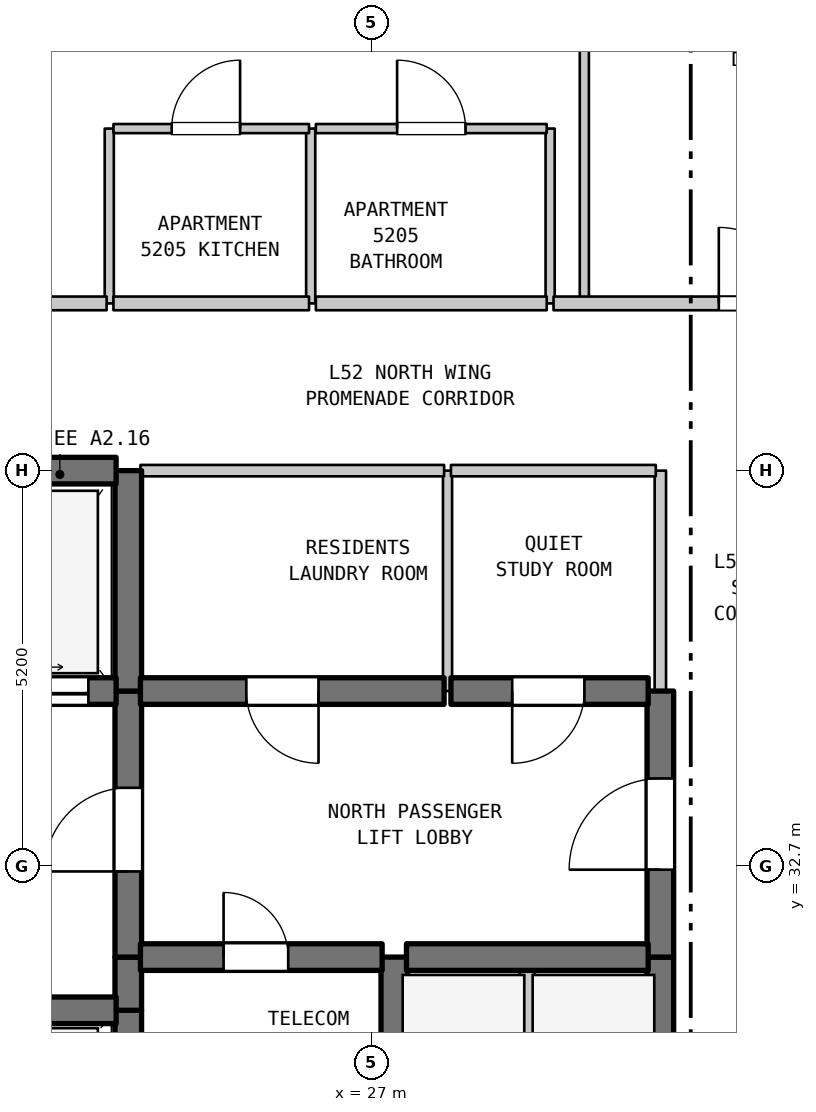
"""IFC4 building model, lengths in metres.
Left out: names, types, materials, properties, quantities, classifications, styles, units other than length and angle.
Written with IfcOpenShell. Run it as: python <this file> out.ifc"""

import sys

from ifc_helpers import new_model, si_unit, direction, frame, frame_2d, origin, place, context, subcontext, project, spatial, rectangle, extrude, element, fill, save


model = new_model("IFC4")
c1 = context("Model", 3, precision=1e-05, world=origin(), true_north=direction((0.0, 1.0)))
c2 = subcontext(c1, "Body", "Model", "MODEL_VIEW")
j1 = project(units=[si_unit("LENGTHUNIT", "METRE"), si_unit("PLANEANGLEUNIT", "RADIAN")], contexts=[c1])
p1 = place(None, origin())
s1 = spatial("IfcSite", under=j1, at=p1, CompositionType="ELEMENT")
p2 = place(p1, origin())
s2 = spatial("IfcBuilding", under=s1, at=p2, CompositionType="ELEMENT")
p3 = place(p2, frame((0.0, 0.0, 210.6)))
s3 = spatial("IfcBuildingStorey", under=s2, at=p3, CompositionType="ELEMENT", Elevation=210.6)
p4 = place(p3, frame((23.55, 40.1, 0.0), z_axis=(0.0, 0.0, 1.0), x_axis=(0.0, 1.0, 0.0)))
e1 = element("IfcWall", 1, at=p4, inside=s3, PredefinedType="PARTITIONING", context=c2, shape_type="SweptSolid", body=[
    extrude(rectangle(XDim=2.3, YDim=0.12, at=frame_2d((1.15, 0.0))), origin(), (0.0, 0.0, 1.0), 3.39),
])
p5 = place(p3, frame((23.8, 29.5, 0.0), z_axis=(0.0, 0.0, 1.0), x_axis=(0.0, 1.0, 0.0)))
e2 = element("IfcWall", 2, at=p5, inside=s3, PredefinedType="SHEAR", context=c2, shape_type="SweptSolid", body=[
    extrude(rectangle(XDim=1.3, YDim=0.35, at=frame_2d((0.65, 0.0))), origin(), (0.0, 0.0, 1.0), 3.39),
])
p6 = place(p3, frame((23.8, 30.8, 0.0), z_axis=(0.0, 0.0, 1.0), x_axis=(0.0, 1.0, 0.0)))
e3 = element("IfcWall", 3, at=p6, inside=s3, PredefinedType="SHEAR", context=c2, shape_type="SweptSolid", body=[
    extrude(rectangle(XDim=0.7, YDim=0.35, at=frame_2d((0.35, 0.0))), origin(), (0.0, 0.0, 1.0), 3.39),
])
p7 = place(p3, frame((23.8, 31.5, 0.0), z_axis=(0.0, 0.0, 1.0), x_axis=(0.0, 1.0, 0.0)))
e4 = element("IfcWall", 4, at=p7, inside=s3, PredefinedType="SHEAR", context=c2, shape_type="SweptSolid", body=[
    extrude(rectangle(XDim=3.5, YDim=0.35, at=frame_2d((1.75, 0.0))), origin(), (0.0, 0.0, 1.0), 3.39),
])
p8 = place(p7, frame((1.127, 0.0, 0.0)))
e5 = element("IfcOpeningElement", 5, at=p8, cuts=e4, PredefinedType="OPENING", context=c2, shape_type="SweptSolid", body=[
    extrude(rectangle(XDim=1.1, YDim=2.15, at=frame_2d((0.55, 1.075))), frame((0.0, 0.185, 0.0), z_axis=(0.0, -1.0, 0.0), x_axis=(1.0, 0.0, 0.0)), (0.0, 0.0, 1.0), 0.37),
])
p9 = place(p3, frame((23.8, 35.0, 0.0), z_axis=(0.0, 0.0, 1.0), x_axis=(0.0, 1.0, 0.0)))
e6 = element("IfcWall", 6, at=p9, inside=s3, PredefinedType="SHEAR", context=c2, shape_type="SweptSolid", body=[
    extrude(rectangle(XDim=2.9, YDim=0.35, at=frame_2d((1.45, 0.0))), origin(), (0.0, 0.0, 1.0), 3.39),
])
p10 = place(p3, frame((26.2, 40.1, 0.0), z_axis=(0.0, 0.0, 1.0), x_axis=(0.0, 1.0, 0.0)))
e7 = element("IfcWall", 7, at=p10, inside=s3, PredefinedType="PARTITIONING", context=c2, shape_type="SweptSolid", body=[
    extrude(rectangle(XDim=2.3, YDim=0.12, at=frame_2d((1.15, 0.0))), origin(), (0.0, 0.0, 1.0), 3.39),
])
p11 = place(p3, frame((27.3, 29.5, 0.0), z_axis=(0.0, 0.0, 1.0), x_axis=(0.0, 1.0, 0.0)))
e8 = element("IfcWall", 8, at=p11, inside=s3, PredefinedType="SHEAR", context=c2, shape_type="SweptSolid", body=[
    extrude(rectangle(XDim=2.0, YDim=0.35, at=frame_2d((1.0, 0.0))), origin(), (0.0, 0.0, 1.0), 3.39),
])
p12 = place(p3, frame((28.0, 35.0, 0.0), z_axis=(0.0, 0.0, 1.0), x_axis=(0.0, 1.0, 0.0)))
e9 = element("IfcWall", 9, at=p12, inside=s3, PredefinedType="PARTITIONING", context=c2, shape_type="SweptSolid", body=[
    extrude(rectangle(XDim=2.9, YDim=0.12, at=frame_2d((1.45, 0.0))), origin(), (0.0, 0.0, 1.0), 3.39),
])
p13 = place(p3, frame((29.05, 28.9, 0.0), z_axis=(0.0, 0.0, 1.0), x_axis=(0.0, 1.0, 0.0)))
e10 = element("IfcWall", 10, at=p13, inside=s3, PredefinedType="STANDARD", context=c2, shape_type="SweptSolid", body=[
    extrude(rectangle(XDim=2.6, YDim=0.2, at=frame_2d((1.3, 0.0))), origin(), (0.0, 0.0, 1.0), 3.39),
])
p14 = place(p3, frame((29.35, 40.1, 0.0), z_axis=(0.0, 0.0, 1.0), x_axis=(0.0, 1.0, 0.0)))
e11 = element("IfcWall", 11, at=p14, inside=s3, PredefinedType="PARTITIONING", context=c2, shape_type="SweptSolid", body=[
    extrude(rectangle(XDim=2.3, YDim=0.12, at=frame_2d((1.15, 0.0))), origin(), (0.0, 0.0, 1.0), 3.39),
])
p15 = place(p3, frame((29.8, 40.1, 0.0), z_axis=(0.0, 0.0, 1.0), x_axis=(0.0, 1.0, 0.0)))
e12 = element("IfcWall", 12, at=p15, inside=s3, PredefinedType="PARTITIONING", context=c2, shape_type="SweptSolid", body=[
    extrude(rectangle(XDim=13.79, YDim=0.12, at=frame_2d((6.895, 0.0))), origin(), (0.0, 0.0, 1.0), 3.39),
])
p16 = place(p3, frame((30.8, 28.9, 0.0), z_axis=(0.0, 0.0, 1.0), x_axis=(0.0, 1.0, 0.0)))
e13 = element("IfcWall", 13, at=p16, inside=s3, PredefinedType="SHEAR", context=c2, shape_type="SweptSolid", body=[
    extrude(rectangle(XDim=2.6, YDim=0.35, at=frame_2d((1.3, 0.0))), origin(), (0.0, 0.0, 1.0), 3.39),
])
p17 = place(p3, frame((30.8, 31.5, 0.0), z_axis=(0.0, 0.0, 1.0), x_axis=(0.0, 1.0, 0.0)))
e14 = element("IfcWall", 14, at=p17, inside=s3, PredefinedType="SHEAR", context=c2, shape_type="SweptSolid", body=[
    extrude(rectangle(XDim=3.5, YDim=0.35, at=frame_2d((1.75, 0.0))), origin(), (0.0, 0.0, 1.0), 3.39),
])
p18 = place(p17, frame((1.15, 0.0, 0.0)))
e15 = element("IfcOpeningElement", 15, at=p18, cuts=e14, PredefinedType="OPENING", context=c2, shape_type="SweptSolid", body=[
    extrude(rectangle(XDim=1.2, YDim=2.2, at=frame_2d((0.6, 1.1))), frame((0.0, 0.185, 0.0), z_axis=(0.0, -1.0, 0.0), x_axis=(1.0, 0.0, 0.0)), (0.0, 0.0, 1.0), 0.37),
])
p19 = place(p3, frame((30.8, 35.0, 0.0), z_axis=(0.0, 0.0, 1.0), x_axis=(0.0, 1.0, 0.0)))
e16 = element("IfcWall", 16, at=p19, inside=s3, PredefinedType="STANDARD", context=c2, shape_type="SweptSolid", body=[
    extrude(rectangle(XDim=2.9, YDim=0.15, at=frame_2d((1.45, 0.0))), origin(), (0.0, 0.0, 1.0), 3.39),
])
p20 = place(p3, frame((19.16, 30.8, 0.0), z_axis=(0.0, 0.0, 1.0), x_axis=(1.0, 0.0, 0.0)))
e17 = element("IfcWall", 17, at=p20, inside=s3, PredefinedType="SHEAR", context=c2, shape_type="SweptSolid", body=[
    extrude(rectangle(XDim=4.48, YDim=0.35, at=frame_2d((2.24, 0.0))), origin(), (0.0, 0.0, 1.0), 3.39),
])
p21 = place(p3, frame((23.96, 31.5, 0.0), z_axis=(0.0, 0.0, 1.0), x_axis=(1.0, 0.0, 0.0)))
e18 = element("IfcWall", 18, at=p21, inside=s3, PredefinedType="SHEAR", context=c2, shape_type="SweptSolid", body=[
    extrude(rectangle(XDim=3.18, YDim=0.35, at=frame_2d((1.59, 0.0))), origin(), (0.0, 0.0, 1.0), 3.39),
])
p22 = place(p21, frame((1.094, 0.0, 0.0)))
e19 = element("IfcOpeningElement", 19, at=p22, cuts=e18, PredefinedType="OPENING", context=c2, shape_type="SweptSolid", body=[
    extrude(rectangle(XDim=0.85, YDim=2.1, at=frame_2d((0.425, 1.05))), frame((0.0, 0.185, 0.0), z_axis=(0.0, -1.0, 0.0), x_axis=(1.0, 0.0, 0.0)), (0.0, 0.0, 1.0), 0.37),
])
p23 = place(p3, frame((27.46, 31.5, 0.0), z_axis=(0.0, 0.0, 1.0), x_axis=(1.0, 0.0, 0.0)))
e20 = element("IfcWall", 20, at=p23, inside=s3, PredefinedType="SHEAR", context=c2, shape_type="SweptSolid", body=[
    extrude(rectangle(XDim=3.18, YDim=0.35, at=frame_2d((1.59, 0.0))), origin(), (0.0, 0.0, 1.0), 3.39),
])
p24 = place(p3, frame((19.16, 35.0, 0.0), z_axis=(0.0, 0.0, 1.0), x_axis=(1.0, 0.0, 0.0)))
e21 = element("IfcWall", 21, at=p24, inside=s3, PredefinedType="SHEAR", context=c2, shape_type="SweptSolid", body=[
    extrude(rectangle(XDim=4.48, YDim=0.35, at=frame_2d((2.24, 0.0))), origin(), (0.0, 0.0, 1.0), 3.39),
])
p25 = place(p24, frame((0.365, 0.0, 0.0)))
e22 = element("IfcOpeningElement", 22, at=p25, cuts=e21, PredefinedType="OPENING", context=c2, shape_type="SweptSolid", body=[
    extrude(rectangle(XDim=1.35, YDim=2.2, at=frame_2d((0.675, 1.1))), frame((0.0, 0.185, 0.0), z_axis=(0.0, -1.0, 0.0), x_axis=(1.0, 0.0, 0.0)), (0.0, 0.0, 1.0), 0.37),
])
p26 = place(p24, frame((2.765, 0.0, 0.0)))
e23 = element("IfcOpeningElement", 23, at=p26, cuts=e21, PredefinedType="OPENING", context=c2, shape_type="SweptSolid", body=[
    extrude(rectangle(XDim=1.35, YDim=2.2, at=frame_2d((0.675, 1.1))), frame((0.0, 0.185, 0.0), z_axis=(0.0, -1.0, 0.0), x_axis=(1.0, 0.0, 0.0)), (0.0, 0.0, 1.0), 0.37),
])
p27 = place(p3, frame((23.96, 35.0, 0.0), z_axis=(0.0, 0.0, 1.0), x_axis=(1.0, 0.0, 0.0)))
e24 = element("IfcWall", 24, at=p27, inside=s3, PredefinedType="SHEAR", context=c2, shape_type="SweptSolid", body=[
    extrude(rectangle(XDim=3.995, YDim=0.35, at=frame_2d((1.998, 0.0))), origin(), (0.0, 0.0, 1.0), 3.39),
])
p28 = place(p27, frame((1.393, 0.0, 0.0)))
e25 = element("IfcOpeningElement", 25, at=p28, cuts=e24, PredefinedType="OPENING", context=c2, shape_type="SweptSolid", body=[
    extrude(rectangle(XDim=0.95, YDim=2.15, at=frame_2d((0.475, 1.075))), frame((0.0, 0.185, 0.0), z_axis=(0.0, -1.0, 0.0), x_axis=(1.0, 0.0, 0.0)), (0.0, 0.0, 1.0), 0.37),
])
p29 = place(p3, frame((28.045, 35.0, 0.0), z_axis=(0.0, 0.0, 1.0), x_axis=(1.0, 0.0, 0.0)))
e26 = element("IfcWall", 26, at=p29, inside=s3, PredefinedType="SHEAR", context=c2, shape_type="SweptSolid", body=[
    extrude(rectangle(XDim=2.595, YDim=0.35, at=frame_2d((1.297, 0.0))), origin(), (0.0, 0.0, 1.0), 3.39),
])
p30 = place(p29, frame((0.806, 0.0, 0.0)))
e27 = element("IfcOpeningElement", 27, at=p30, cuts=e26, PredefinedType="OPENING", context=c2, shape_type="SweptSolid", body=[
    extrude(rectangle(XDim=0.95, YDim=2.15, at=frame_2d((0.475, 1.075))), frame((0.0, 0.185, 0.0), z_axis=(0.0, -1.0, 0.0), x_axis=(1.0, 0.0, 0.0)), (0.0, 0.0, 1.0), 0.37),
])
p31 = place(p3, frame((19.16, 37.9, 0.0), z_axis=(0.0, 0.0, 1.0), x_axis=(1.0, 0.0, 0.0)))
e28 = element("IfcWall", 28, at=p31, inside=s3, PredefinedType="SHEAR", context=c2, shape_type="SweptSolid", body=[
    extrude(rectangle(XDim=4.48, YDim=0.35, at=frame_2d((2.24, 0.0))), origin(), (0.0, 0.0, 1.0), 3.39),
])
p32 = place(p3, frame((23.96, 37.9, 0.0), z_axis=(0.0, 0.0, 1.0), x_axis=(1.0, 0.0, 0.0)))
e29 = element("IfcWall", 29, at=p32, inside=s3, PredefinedType="STANDARD", context=c2, shape_type="SweptSolid", body=[
    extrude(rectangle(XDim=3.995, YDim=0.15, at=frame_2d((1.998, 0.0))), origin(), (0.0, 0.0, 1.0), 2.89),
])
p33 = place(p3, frame((28.045, 37.9, 0.0), z_axis=(0.0, 0.0, 1.0), x_axis=(1.0, 0.0, 0.0)))
e30 = element("IfcWall", 30, at=p33, inside=s3, PredefinedType="STANDARD", context=c2, shape_type="SweptSolid", body=[
    extrude(rectangle(XDim=2.695, YDim=0.15, at=frame_2d((1.348, 0.0))), origin(), (0.0, 0.0, 1.0), 2.89),
])
p34 = place(p3, frame((19.555, 40.1, 0.0), z_axis=(0.0, 0.0, 1.0), x_axis=(1.0, 0.0, 0.0)))
e31 = element("IfcWall", 31, at=p34, inside=s3, PredefinedType="STANDARD", context=c2, shape_type="SweptSolid", body=[
    extrude(rectangle(XDim=3.96, YDim=0.18, at=frame_2d((1.98, 0.0))), origin(), (0.0, 0.0, 1.0), 3.39),
])
p35 = place(p34, frame((1.48, 0.0, 0.0)))
e32 = element("IfcOpeningElement", 32, at=p35, cuts=e31, PredefinedType="OPENING", context=c2, shape_type="SweptSolid", body=[
    extrude(rectangle(XDim=1.0, YDim=2.15, at=frame_2d((0.5, 1.075))), frame((0.0, 0.1, 0.0), z_axis=(0.0, -1.0, 0.0), x_axis=(1.0, 0.0, 0.0)), (0.0, 0.0, 1.0), 0.2),
])
p36 = place(p3, frame((23.605, 40.1, 0.0), z_axis=(0.0, 0.0, 1.0), x_axis=(1.0, 0.0, 0.0)))
e33 = element("IfcWall", 33, at=p36, inside=s3, PredefinedType="STANDARD", context=c2, shape_type="SweptSolid", body=[
    extrude(rectangle(XDim=2.573, YDim=0.18, at=frame_2d((1.287, 0.0))), origin(), (0.0, 0.0, 1.0), 3.39),
])
p37 = place(p3, frame((26.268, 40.1, 0.0), z_axis=(0.0, 0.0, 1.0), x_axis=(1.0, 0.0, 0.0)))
e34 = element("IfcWall", 34, at=p37, inside=s3, PredefinedType="STANDARD", context=c2, shape_type="SweptSolid", body=[
    extrude(rectangle(XDim=3.037, YDim=0.18, at=frame_2d((1.519, 0.0))), origin(), (0.0, 0.0, 1.0), 3.39),
])
p38 = place(p3, frame((29.395, 40.1, 0.0), z_axis=(0.0, 0.0, 1.0), x_axis=(1.0, 0.0, 0.0)))
e35 = element("IfcWall", 35, at=p38, inside=s3, PredefinedType="STANDARD", context=c2, shape_type="SweptSolid", body=[
    extrude(rectangle(XDim=5.09, YDim=0.18, at=frame_2d((2.545, 0.0))), origin(), (0.0, 0.0, 1.0), 3.39),
])
p39 = place(p38, frame((2.174, 0.0, 0.0)))
e36 = element("IfcOpeningElement", 36, at=p39, cuts=e35, PredefinedType="OPENING", context=c2, shape_type="SweptSolid", body=[
    extrude(rectangle(XDim=1.0, YDim=2.15, at=frame_2d((0.5, 1.075))), frame((0.0, 0.1, 0.0), z_axis=(0.0, -1.0, 0.0), x_axis=(1.0, 0.0, 0.0)), (0.0, 0.0, 1.0), 0.2),
])
p40 = place(p3, frame((23.605, 42.4, 0.0), z_axis=(0.0, 0.0, 1.0), x_axis=(1.0, 0.0, 0.0)))
e37 = element("IfcWall", 37, at=p40, inside=s3, PredefinedType="PARTITIONING", context=c2, shape_type="SweptSolid", body=[
    extrude(rectangle(XDim=2.573, YDim=0.12, at=frame_2d((1.287, 0.0))), origin(), (0.0, 0.0, 1.0), 3.39),
])
p41 = place(p40, frame((0.766, 0.0, 0.0)))
e38 = element("IfcOpeningElement", 38, at=p41, cuts=e37, PredefinedType="OPENING", context=c2, shape_type="SweptSolid", body=[
    extrude(rectangle(XDim=0.9, YDim=2.15, at=frame_2d((0.45, 1.075))), frame((0.0, 0.07, 0.0), z_axis=(0.0, -1.0, 0.0), x_axis=(1.0, 0.0, 0.0)), (0.0, 0.0, 1.0), 0.14),
])
p42 = place(p3, frame((26.268, 42.4, 0.0), z_axis=(0.0, 0.0, 1.0), x_axis=(1.0, 0.0, 0.0)))
e39 = element("IfcWall", 39, at=p42, inside=s3, PredefinedType="PARTITIONING", context=c2, shape_type="SweptSolid", body=[
    extrude(rectangle(XDim=3.037, YDim=0.12, at=frame_2d((1.519, 0.0))), origin(), (0.0, 0.0, 1.0), 3.39),
])
p43 = place(p42, frame((1.069, 0.0, 0.0)))
e40 = element("IfcOpeningElement", 40, at=p43, cuts=e39, PredefinedType="OPENING", context=c2, shape_type="SweptSolid", body=[
    extrude(rectangle(XDim=0.9, YDim=2.1, at=frame_2d((0.45, 1.05))), frame((0.0, 0.07, 0.0), z_axis=(0.0, -1.0, 0.0), x_axis=(1.0, 0.0, 0.0)), (0.0, 0.0, 1.0), 0.14),
])
p44 = place(p8, origin())
e41 = element("IfcDoor", 41, at=p44, inside=s3, OperationType="SINGLE_SWING_LEFT", PredefinedType="DOOR", context=c2, shape_type="SweptSolid", body=[
    extrude(rectangle(XDim=1.1, YDim=2.15, at=frame_2d((0.55, 1.075))), frame((0.0, 0.025, 0.0), z_axis=(0.0, -1.0, 0.0), x_axis=(1.0, 0.0, 0.0)), (0.0, 0.0, 1.0), 0.05),
])
fill(e5, e41)
p45 = place(p18, origin())
e42 = element("IfcDoor", 42, at=p45, inside=s3, OperationType="SINGLE_SWING_LEFT", PredefinedType="DOOR", context=c2, shape_type="SweptSolid", body=[
    extrude(rectangle(XDim=1.2, YDim=2.2, at=frame_2d((0.6, 1.1))), frame((0.0, 0.025, 0.0), z_axis=(0.0, -1.0, 0.0), x_axis=(1.0, 0.0, 0.0)), (0.0, 0.0, 1.0), 0.05),
])
fill(e15, e42)
p46 = place(p22, origin())
e43 = element("IfcDoor", 43, at=p46, inside=s3, OperationType="SINGLE_SWING_LEFT", PredefinedType="DOOR", context=c2, shape_type="SweptSolid", body=[
    extrude(rectangle(XDim=0.85, YDim=2.1, at=frame_2d((0.425, 1.05))), frame((0.0, 0.025, 0.0), z_axis=(0.0, -1.0, 0.0), x_axis=(1.0, 0.0, 0.0)), (0.0, 0.0, 1.0), 0.05),
])
fill(e19, e43)
p47 = place(p26, origin())
e44 = element("IfcDoor", 44, at=p47, inside=s3, OperationType="DOUBLE_DOOR_SLIDING", PredefinedType="DOOR", context=c2, shape_type="SweptSolid", body=[
    extrude(rectangle(XDim=1.35, YDim=2.2, at=frame_2d((0.675, 1.1))), frame((0.0, 0.025, 0.0), z_axis=(0.0, -1.0, 0.0), x_axis=(1.0, 0.0, 0.0)), (0.0, 0.0, 1.0), 0.05),
])
fill(e23, e44)
p48 = place(p28, frame((0.95, 0.0, 0.0), z_axis=(0.0, 0.0, 1.0), x_axis=(-1.0, 0.0, 0.0)))
e45 = element("IfcDoor", 45, at=p48, inside=s3, OperationType="SINGLE_SWING_RIGHT", PredefinedType="DOOR", context=c2, shape_type="SweptSolid", body=[
    extrude(rectangle(XDim=0.95, YDim=2.15, at=frame_2d((0.475, 1.075))), frame((0.0, 0.025, 0.0), z_axis=(0.0, -1.0, 0.0), x_axis=(1.0, 0.0, 0.0)), (0.0, 0.0, 1.0), 0.05),
])
fill(e25, e45)
p49 = place(p30, frame((0.95, 0.0, 0.0), z_axis=(0.0, 0.0, 1.0), x_axis=(-1.0, 0.0, 0.0)))
e46 = element("IfcDoor", 46, at=p49, inside=s3, OperationType="SINGLE_SWING_LEFT", PredefinedType="DOOR", context=c2, shape_type="SweptSolid", body=[
    extrude(rectangle(XDim=0.95, YDim=2.15, at=frame_2d((0.475, 1.075))), frame((0.0, 0.025, 0.0), z_axis=(0.0, -1.0, 0.0), x_axis=(1.0, 0.0, 0.0)), (0.0, 0.0, 1.0), 0.05),
])
fill(e27, e46)
p50 = place(p39, origin())
e47 = element("IfcDoor", 47, at=p50, inside=s3, OperationType="SINGLE_SWING_LEFT", PredefinedType="DOOR", context=c2, shape_type="SweptSolid", body=[
    extrude(rectangle(XDim=1.0, YDim=2.15, at=frame_2d((0.5, 1.075))), frame((0.0, 0.025, 0.0), z_axis=(0.0, -1.0, 0.0), x_axis=(1.0, 0.0, 0.0)), (0.0, 0.0, 1.0), 0.05),
])
fill(e36, e47)
p51 = place(p41, origin())
e48 = element("IfcDoor", 48, at=p51, inside=s3, OperationType="SINGLE_SWING_RIGHT", PredefinedType="DOOR", context=c2, shape_type="SweptSolid", body=[
    extrude(rectangle(XDim=0.9, YDim=2.15, at=frame_2d((0.45, 1.075))), frame((0.0, 0.025, 0.0), z_axis=(0.0, -1.0, 0.0), x_axis=(1.0, 0.0, 0.0)), (0.0, 0.0, 1.0), 0.05),
])
fill(e38, e48)
p52 = place(p43, origin())
e49 = element("IfcDoor", 49, at=p52, inside=s3, OperationType="SINGLE_SWING_LEFT", PredefinedType="DOOR", context=c2, shape_type="SweptSolid", body=[
    extrude(rectangle(XDim=0.9, YDim=2.1, at=frame_2d((0.45, 1.05))), frame((0.0, 0.025, 0.0), z_axis=(0.0, -1.0, 0.0), x_axis=(1.0, 0.0, 0.0)), (0.0, 0.0, 1.0), 0.05),
])
fill(e40, e49)
save(model, sys.argv[1])
